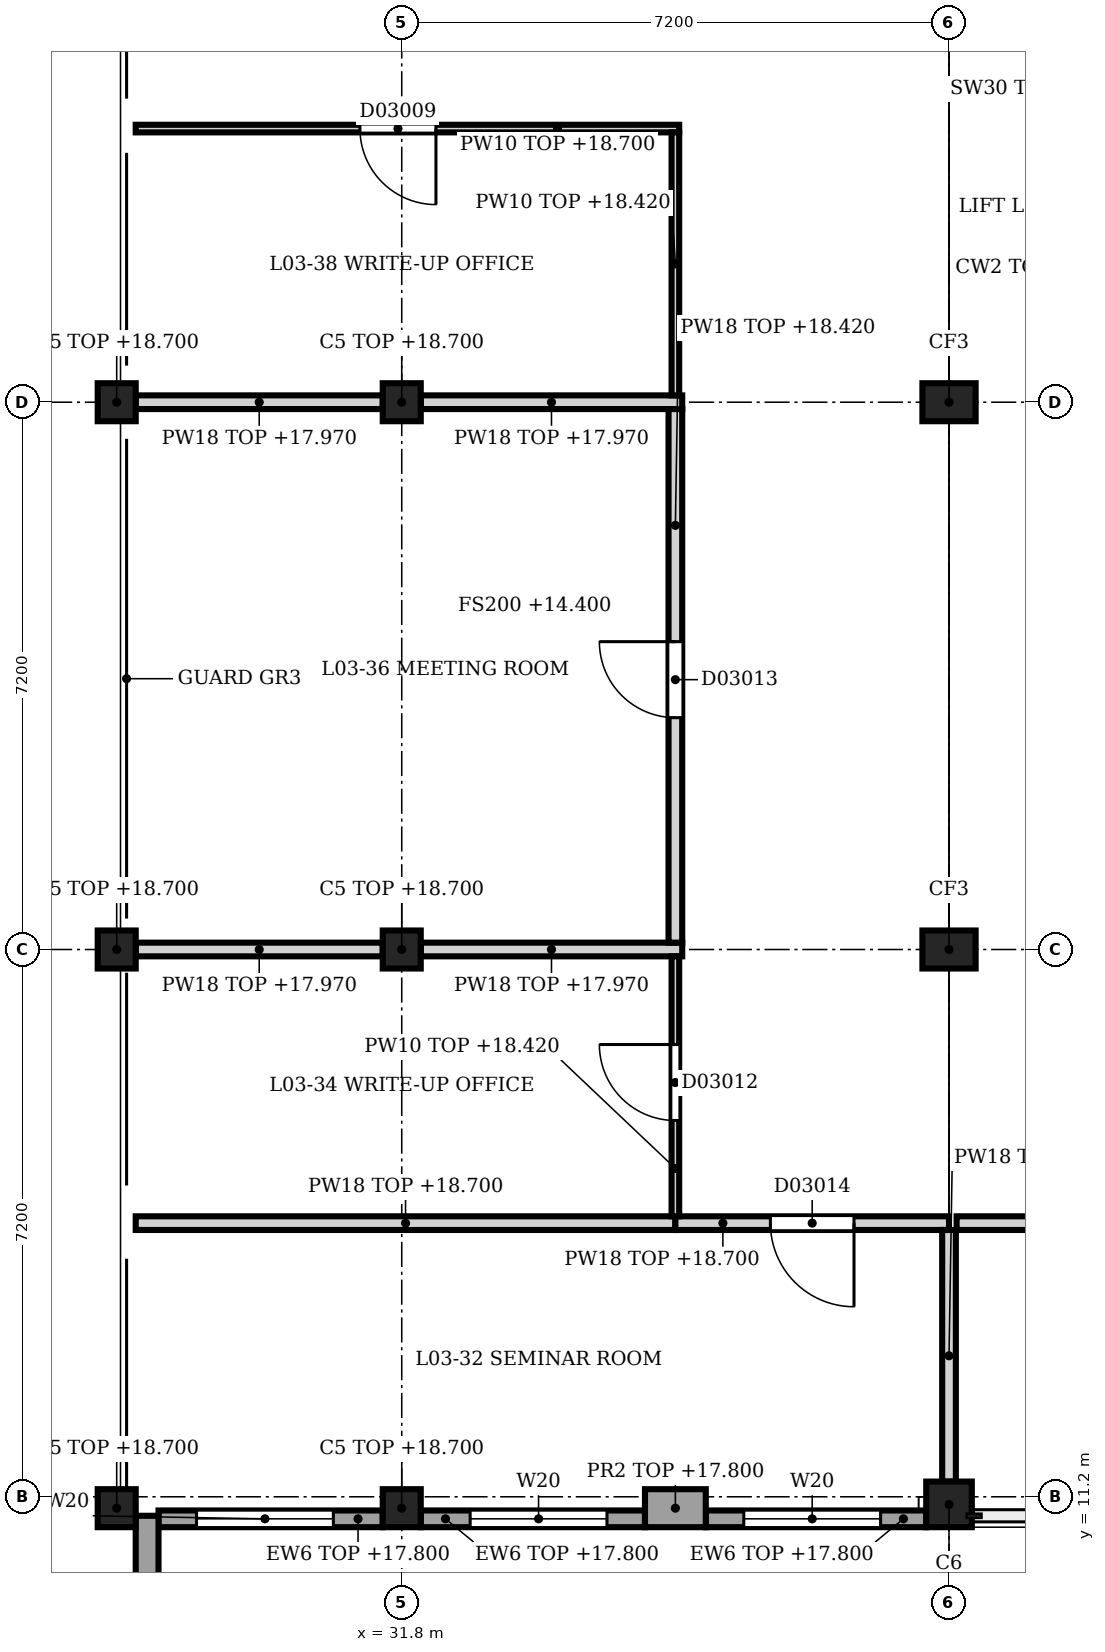
"""IFC4 building model, lengths in metres.
Left out: names, types, materials, properties, quantities, classifications, styles, units other than length and angle.
Written with IfcOpenShell. Run it as: python <this file> out.ifc"""

import sys

from ifc_helpers import new_model, si_unit, direction, frame, frame_2d, origin, origin_2d, place, context, subcontext, project, spatial, polyline, rectangle, outline, extrude, element, fill, save


model = new_model("IFC4")
c1 = context("Model", 3, precision=1e-05, world=origin(), true_north=direction((0.0, 1.0)))
c2 = subcontext(c1, "Body", "Model", "MODEL_VIEW")
j1 = project(units=[si_unit("LENGTHUNIT", "METRE"), si_unit("PLANEANGLEUNIT", "RADIAN")], contexts=[c1])
p1 = place(None, origin())
s1 = spatial("IfcSite", under=j1, at=p1, CompositionType="ELEMENT")
p2 = place(p1, origin())
s2 = spatial("IfcBuilding", under=s1, at=p2, CompositionType="ELEMENT")
p3 = place(p2, frame((0.0, 0.0, 14.4)))
s3 = spatial("IfcBuildingStorey", under=s2, at=p3, CompositionType="ELEMENT", Elevation=14.4)
p4 = place(p3, frame((39.0, 11.1, 0.0), z_axis=(0.0, 0.0, 1.0), x_axis=(1.0, 0.0, 0.0)))
e1 = element("IfcColumn", 1, at=p4, inside=s3, PredefinedType="COLUMN", context=c2, shape_type="SweptSolid", body=[
    extrude(rectangle(XDim=0.6, YDim=0.6, at=origin_2d()), origin(), (0.0, 0.0, 1.0), 4.5),
])
for number, where, z_axis, x_axis in (
    (2, (39.0, 18.4, 0.0), (0.0, 0.0, 1.0), (1.0, 0.0, 0.0)),
    (3, (39.0, 25.6, 0.0), (0.0, 0.0, 1.0), (1.0, 0.0, 0.0)),
):
    element("IfcColumn", number, at=place(p3, frame(where, z_axis=z_axis, x_axis=x_axis)), inside=s3, PredefinedType="COLUMN", context=c2, shape_type="SweptSolid", body=[
        extrude(rectangle(XDim=0.7, YDim=0.5, at=origin_2d()), origin(), (0.0, 0.0, 1.0), 4.5),
    ])
for number, where, z_axis, x_axis in (
    (4, (28.05, 11.05, 0.0), (0.0, 0.0, 1.0), (1.0, 0.0, 0.0)),
    (5, (28.05, 18.4, 0.0), (0.0, 0.0, 1.0), (1.0, 0.0, 0.0)),
    (6, (28.05, 25.6, 0.0), (0.0, 0.0, 1.0), (1.0, 0.0, 0.0)),
    (7, (31.8, 11.05, 0.0), (0.0, 0.0, 1.0), (1.0, 0.0, 0.0)),
    (8, (31.8, 18.4, 0.0), (0.0, 0.0, 1.0), (1.0, 0.0, 0.0)),
    (9, (31.8, 25.6, 0.0), (0.0, 0.0, 1.0), (1.0, 0.0, 0.0)),
):
    element("IfcColumn", number, at=place(p3, frame(where, z_axis=z_axis, x_axis=x_axis)), inside=s3, PredefinedType="COLUMN", context=c2, shape_type="SweptSolid", body=[
        extrude(rectangle(XDim=0.5, YDim=0.5, at=origin_2d()), origin(), (0.0, 0.0, 1.0), 4.3),
    ])
p5 = place(p3, frame((28.45, 10.95, 0.0), z_axis=(0.0, 0.0, 1.0), x_axis=(0.0, -1.0, 0.0)))
e10 = element("IfcWall", 10, at=p5, inside=s3, PredefinedType="SOLIDWALL", context=c2, shape_type="SweptSolid", body=[
    extrude(outline(polyline([(0.0, 0.0), (6.95, 0.0), (6.95, 4.4), (0.0, 2.663), (0.0, 0.0)])), frame((0.0, 0.15, 0.0), z_axis=(0.0, -1.0, 0.0), x_axis=(1.0, 0.0, 0.0)), (0.0, 0.0, 1.0), 0.3),
])
p6 = place(p3, frame((35.8, 11.05, 0.0), z_axis=(0.0, 0.0, 1.0), x_axis=(-1.0, 0.0, 0.0)))
e11 = element("IfcWall", 11, at=p6, inside=s3, PredefinedType="SOLIDWALL", context=c2, shape_type="SweptSolid", body=[
    extrude(rectangle(XDim=0.8, YDim=0.5, at=frame_2d((0.4, 0.0))), origin(), (0.0, 0.0, 1.0), 3.4),
])
p7 = place(p3, frame((38.7, 10.91, 0.0), z_axis=(0.0, 0.0, 1.0), x_axis=(-1.0, 0.0, 0.0)))
e12 = element("IfcWall", 12, at=p7, inside=s3, PredefinedType="SOLIDWALL", context=c2, shape_type="SweptSolid", body=[
    extrude(rectangle(XDim=2.9, YDim=0.22, at=frame_2d((1.45, 0.0))), origin(), (0.0, 0.0, 1.0), 3.4),
])
p8 = place(p7, frame((0.6, 0.0, 0.45)))
e13 = element("IfcOpeningElement", 13, at=p8, cuts=e12, PredefinedType="OPENING", context=c2, shape_type="SweptSolid", body=[
    extrude(rectangle(XDim=1.8, YDim=2.7, at=frame_2d((0.9, 1.35))), frame((0.0, 0.12, 0.0), z_axis=(0.0, -1.0, 0.0), x_axis=(1.0, 0.0, 0.0)), (0.0, 0.0, 1.0), 0.24),
])
p9 = place(p3, frame((35.0, 10.91, 0.0), z_axis=(0.0, 0.0, 1.0), x_axis=(-1.0, 0.0, 0.0)))
e14 = element("IfcWall", 14, at=p9, inside=s3, PredefinedType="SOLIDWALL", context=c2, shape_type="SweptSolid", body=[
    extrude(rectangle(XDim=2.95, YDim=0.22, at=frame_2d((1.475, 0.0))), origin(), (0.0, 0.0, 1.0), 3.4),
])
p10 = place(p9, frame((0.5, 0.0, 0.45)))
e15 = element("IfcOpeningElement", 15, at=p10, cuts=e14, PredefinedType="OPENING", context=c2, shape_type="SweptSolid", body=[
    extrude(rectangle(XDim=1.8, YDim=2.7, at=frame_2d((0.9, 1.35))), frame((0.0, 0.12, 0.0), z_axis=(0.0, -1.0, 0.0), x_axis=(1.0, 0.0, 0.0)), (0.0, 0.0, 1.0), 0.24),
])
p11 = place(p3, frame((31.55, 10.91, 0.0), z_axis=(0.0, 0.0, 1.0), x_axis=(-1.0, 0.0, 0.0)))
e16 = element("IfcWall", 16, at=p11, inside=s3, PredefinedType="SOLIDWALL", context=c2, shape_type="SweptSolid", body=[
    extrude(rectangle(XDim=2.95, YDim=0.22, at=frame_2d((1.475, 0.0))), origin(), (0.0, 0.0, 1.0), 3.4),
])
p12 = place(p11, frame((0.65, 0.0, 0.45)))
e17 = element("IfcOpeningElement", 17, at=p12, cuts=e16, PredefinedType="OPENING", context=c2, shape_type="SweptSolid", body=[
    extrude(rectangle(XDim=1.8, YDim=2.7, at=frame_2d((0.9, 1.35))), frame((0.0, 0.12, 0.0), z_axis=(0.0, -1.0, 0.0), x_axis=(1.0, 0.0, 0.0)), (0.0, 0.0, 1.0), 0.24),
])
p13 = place(p3, frame((28.3, 14.8, 0.0), z_axis=(0.0, 0.0, 1.0), x_axis=(1.0, 0.0, 0.0)))
e18 = element("IfcWall", 18, at=p13, inside=s3, PredefinedType="PARTITIONING", context=c2, shape_type="SweptSolid", body=[
    extrude(rectangle(XDim=7.1, YDim=0.18, at=frame_2d((3.55, 0.0))), origin(), (0.0, 0.0, 1.0), 4.3),
])
p14 = place(p3, frame((39.0, 14.8, 0.0), z_axis=(0.0, 0.0, 1.0), x_axis=(-1.0, 0.0, 0.0)))
e19 = element("IfcWall", 19, at=p14, inside=s3, PredefinedType="PARTITIONING", context=c2, shape_type="SweptSolid", body=[
    extrude(rectangle(XDim=3.6, YDim=0.18, at=frame_2d((1.8, 0.0))), origin(), (0.0, 0.0, 1.0), 4.3),
])
p15 = place(p14, frame((1.25, 0.0, 0.0)))
e20 = element("IfcOpeningElement", 20, at=p15, cuts=e19, PredefinedType="OPENING", context=c2, shape_type="SweptSolid", body=[
    extrude(rectangle(XDim=1.1, YDim=2.3, at=frame_2d((0.55, 1.15))), frame((0.0, 0.1, 0.0), z_axis=(0.0, -1.0, 0.0), x_axis=(1.0, 0.0, 0.0)), (0.0, 0.0, 1.0), 0.2),
])
p16 = place(p3, frame((42.5, 14.8, 0.0), z_axis=(0.0, 0.0, 1.0), x_axis=(-1.0, 0.0, 0.0)))
e21 = element("IfcWall", 21, at=p16, inside=s3, PredefinedType="PARTITIONING", context=c2, shape_type="SweptSolid", body=[
    extrude(rectangle(XDim=3.4, YDim=0.18, at=frame_2d((1.7, 0.0))), origin(), (0.0, 0.0, 1.0), 11.4),
])
p17 = place(p16, frame((1.15, 0.0, 0.0)))
e22 = element("IfcOpeningElement", 22, at=p17, cuts=e21, PredefinedType="OPENING", context=c2, shape_type="SweptSolid", body=[
    extrude(rectangle(XDim=1.1, YDim=2.3, at=frame_2d((0.55, 1.15))), frame((0.0, 0.1, 0.0), z_axis=(0.0, -1.0, 0.0), x_axis=(1.0, 0.0, 0.0)), (0.0, 0.0, 1.0), 0.2),
])
p18 = place(p3, frame((28.3, 18.4, 0.0), z_axis=(0.0, 0.0, 1.0), x_axis=(1.0, 0.0, 0.0)))
e23 = element("IfcWall", 23, at=p18, inside=s3, PredefinedType="PARTITIONING", context=c2, shape_type="SweptSolid", body=[
    extrude(rectangle(XDim=3.25, YDim=0.18, at=frame_2d((1.625, 0.0))), origin(), (0.0, 0.0, 1.0), 3.57),
])
p19 = place(p3, frame((32.05, 18.4, 0.0), z_axis=(0.0, 0.0, 1.0), x_axis=(1.0, 0.0, 0.0)))
e24 = element("IfcWall", 24, at=p19, inside=s3, PredefinedType="PARTITIONING", context=c2, shape_type="SweptSolid", body=[
    extrude(rectangle(XDim=3.44, YDim=0.18, at=frame_2d((1.72, 0.0))), origin(), (0.0, 0.0, 1.0), 3.57),
])
p20 = place(p3, frame((28.3, 25.6, 0.0), z_axis=(0.0, 0.0, 1.0), x_axis=(1.0, 0.0, 0.0)))
e25 = element("IfcWall", 25, at=p20, inside=s3, PredefinedType="PARTITIONING", context=c2, shape_type="SweptSolid", body=[
    extrude(rectangle(XDim=3.25, YDim=0.18, at=frame_2d((1.625, 0.0))), origin(), (0.0, 0.0, 1.0), 3.57),
])
p21 = place(p3, frame((32.05, 25.6, 0.0), z_axis=(0.0, 0.0, 1.0), x_axis=(1.0, 0.0, 0.0)))
e26 = element("IfcWall", 26, at=p21, inside=s3, PredefinedType="PARTITIONING", context=c2, shape_type="SweptSolid", body=[
    extrude(rectangle(XDim=3.44, YDim=0.18, at=frame_2d((1.72, 0.0))), origin(), (0.0, 0.0, 1.0), 3.57),
])
p22 = place(p3, frame((35.45, 29.2, 0.0), z_axis=(0.0, 0.0, 1.0), x_axis=(-1.0, 0.0, 0.0)))
e27 = element("IfcWall", 27, at=p22, inside=s3, PredefinedType="PARTITIONING", context=c2, shape_type="SweptSolid", body=[
    extrude(rectangle(XDim=7.15, YDim=0.1, at=frame_2d((3.575, 0.0))), origin(), (0.0, 0.0, 1.0), 4.3),
])
p23 = place(p22, frame((3.2, 0.0, 0.0)))
e28 = element("IfcOpeningElement", 28, at=p23, cuts=e27, PredefinedType="OPENING", context=c2, shape_type="SweptSolid", body=[
    extrude(rectangle(XDim=1.0, YDim=2.1, at=frame_2d((0.5, 1.05))), frame((0.0, 0.06, 0.0), z_axis=(0.0, -1.0, 0.0), x_axis=(1.0, 0.0, 0.0)), (0.0, 0.0, 1.0), 0.12),
])
p24 = place(p3, frame((35.4, 14.89, 0.0), z_axis=(0.0, 0.0, 1.0), x_axis=(0.0, 1.0, 0.0)))
e29 = element("IfcWall", 29, at=p24, inside=s3, PredefinedType="PARTITIONING", context=c2, shape_type="SweptSolid", body=[
    extrude(rectangle(XDim=3.42, YDim=0.1, at=frame_2d((1.71, 0.0))), origin(), (0.0, 0.0, 1.0), 4.02),
])
p25 = place(p24, frame((1.26, 0.0, 0.0)))
e30 = element("IfcOpeningElement", 30, at=p25, cuts=e29, PredefinedType="OPENING", context=c2, shape_type="SweptSolid", body=[
    extrude(rectangle(XDim=1.0, YDim=2.1, at=frame_2d((0.5, 1.05))), frame((0.0, 0.06, 0.0), z_axis=(0.0, -1.0, 0.0), x_axis=(1.0, 0.0, 0.0)), (0.0, 0.0, 1.0), 0.12),
])
p26 = place(p3, frame((35.4, 18.49, 0.0), z_axis=(0.0, 0.0, 1.0), x_axis=(0.0, 1.0, 0.0)))
e31 = element("IfcWall", 31, at=p26, inside=s3, PredefinedType="PARTITIONING", context=c2, shape_type="SweptSolid", body=[
    extrude(rectangle(XDim=7.02, YDim=0.18, at=frame_2d((3.51, 0.0))), origin(), (0.0, 0.0, 1.0), 4.02),
])
p27 = place(p26, frame((2.96, 0.0, 0.0)))
e32 = element("IfcOpeningElement", 32, at=p27, cuts=e31, PredefinedType="OPENING", context=c2, shape_type="SweptSolid", body=[
    extrude(rectangle(XDim=1.0, YDim=2.1, at=frame_2d((0.5, 1.05))), frame((0.0, 0.1, 0.0), z_axis=(0.0, -1.0, 0.0), x_axis=(1.0, 0.0, 0.0)), (0.0, 0.0, 1.0), 0.2),
])
p28 = place(p3, frame((35.4, 25.69, 0.0), z_axis=(0.0, 0.0, 1.0), x_axis=(0.0, 1.0, 0.0)))
e33 = element("IfcWall", 33, at=p28, inside=s3, PredefinedType="PARTITIONING", context=c2, shape_type="SweptSolid", body=[
    extrude(rectangle(XDim=3.46, YDim=0.1, at=frame_2d((1.73, 0.0))), origin(), (0.0, 0.0, 1.0), 4.02),
])
p29 = place(p3, frame((39.0, 11.4, 0.0), z_axis=(0.0, 0.0, 1.0), x_axis=(0.0, 1.0, 0.0)))
e34 = element("IfcWall", 34, at=p29, inside=s3, PredefinedType="PARTITIONING", context=c2, shape_type="SweptSolid", body=[
    extrude(rectangle(XDim=3.31, YDim=0.18, at=frame_2d((1.655, 0.0))), origin(), (0.0, 0.0, 1.0), 3.77),
])
p30 = place(p8, origin())
e35 = element("IfcWindow", 35, at=p30, inside=s3, PartitioningType="SINGLE_PANEL", PredefinedType="WINDOW", context=c2, shape_type="SweptSolid", body=[
    extrude(rectangle(XDim=1.8, YDim=2.7, at=frame_2d((0.9, 1.35))), frame((0.0, 0.03, 0.0), z_axis=(0.0, -1.0, 0.0), x_axis=(1.0, 0.0, 0.0)), (0.0, 0.0, 1.0), 0.06),
])
fill(e13, e35)
p31 = place(p10, origin())
e36 = element("IfcWindow", 36, at=p31, inside=s3, PartitioningType="SINGLE_PANEL", PredefinedType="WINDOW", context=c2, shape_type="SweptSolid", body=[
    extrude(rectangle(XDim=1.8, YDim=2.7, at=frame_2d((0.9, 1.35))), frame((0.0, 0.03, 0.0), z_axis=(0.0, -1.0, 0.0), x_axis=(1.0, 0.0, 0.0)), (0.0, 0.0, 1.0), 0.06),
])
fill(e15, e36)
p32 = place(p12, origin())
e37 = element("IfcWindow", 37, at=p32, inside=s3, PartitioningType="SINGLE_PANEL", PredefinedType="WINDOW", context=c2, shape_type="SweptSolid", body=[
    extrude(rectangle(XDim=1.8, YDim=2.7, at=frame_2d((0.9, 1.35))), frame((0.0, 0.03, 0.0), z_axis=(0.0, -1.0, 0.0), x_axis=(1.0, 0.0, 0.0)), (0.0, 0.0, 1.0), 0.06),
])
fill(e17, e37)
p33 = place(p15, origin())
e38 = element("IfcDoor", 38, at=p33, inside=s3, OperationType="SINGLE_SWING_LEFT", PredefinedType="DOOR", context=c2, shape_type="SweptSolid", body=[
    extrude(rectangle(XDim=1.1, YDim=2.3, at=frame_2d((0.55, 1.15))), frame((0.0, 0.025, 0.0), z_axis=(0.0, -1.0, 0.0), x_axis=(1.0, 0.0, 0.0)), (0.0, 0.0, 1.0), 0.05),
])
fill(e20, e38)
p34 = place(p23, origin())
e39 = element("IfcDoor", 39, at=p34, inside=s3, OperationType="SINGLE_SWING_RIGHT", PredefinedType="DOOR", context=c2, shape_type="SweptSolid", body=[
    extrude(rectangle(XDim=1.0, YDim=2.1, at=frame_2d((0.5, 1.05))), frame((0.0, 0.025, 0.0), z_axis=(0.0, -1.0, 0.0), x_axis=(1.0, 0.0, 0.0)), (0.0, 0.0, 1.0), 0.05),
])
fill(e28, e39)
p35 = place(p25, origin())
e40 = element("IfcDoor", 40, at=p35, inside=s3, OperationType="SINGLE_SWING_RIGHT", PredefinedType="DOOR", context=c2, shape_type="SweptSolid", body=[
    extrude(rectangle(XDim=1.0, YDim=2.1, at=frame_2d((0.5, 1.05))), frame((0.0, 0.025, 0.0), z_axis=(0.0, -1.0, 0.0), x_axis=(1.0, 0.0, 0.0)), (0.0, 0.0, 1.0), 0.05),
])
fill(e30, e40)
p36 = place(p27, origin())
e41 = element("IfcDoor", 41, at=p36, inside=s3, OperationType="SINGLE_SWING_LEFT", PredefinedType="DOOR", context=c2, shape_type="SweptSolid", body=[
    extrude(rectangle(XDim=1.0, YDim=2.1, at=frame_2d((0.5, 1.05))), frame((0.0, 0.025, 0.0), z_axis=(0.0, -1.0, 0.0), x_axis=(1.0, 0.0, 0.0)), (0.0, 0.0, 1.0), 0.05),
])
fill(e32, e41)
save(model, sys.argv[1])
